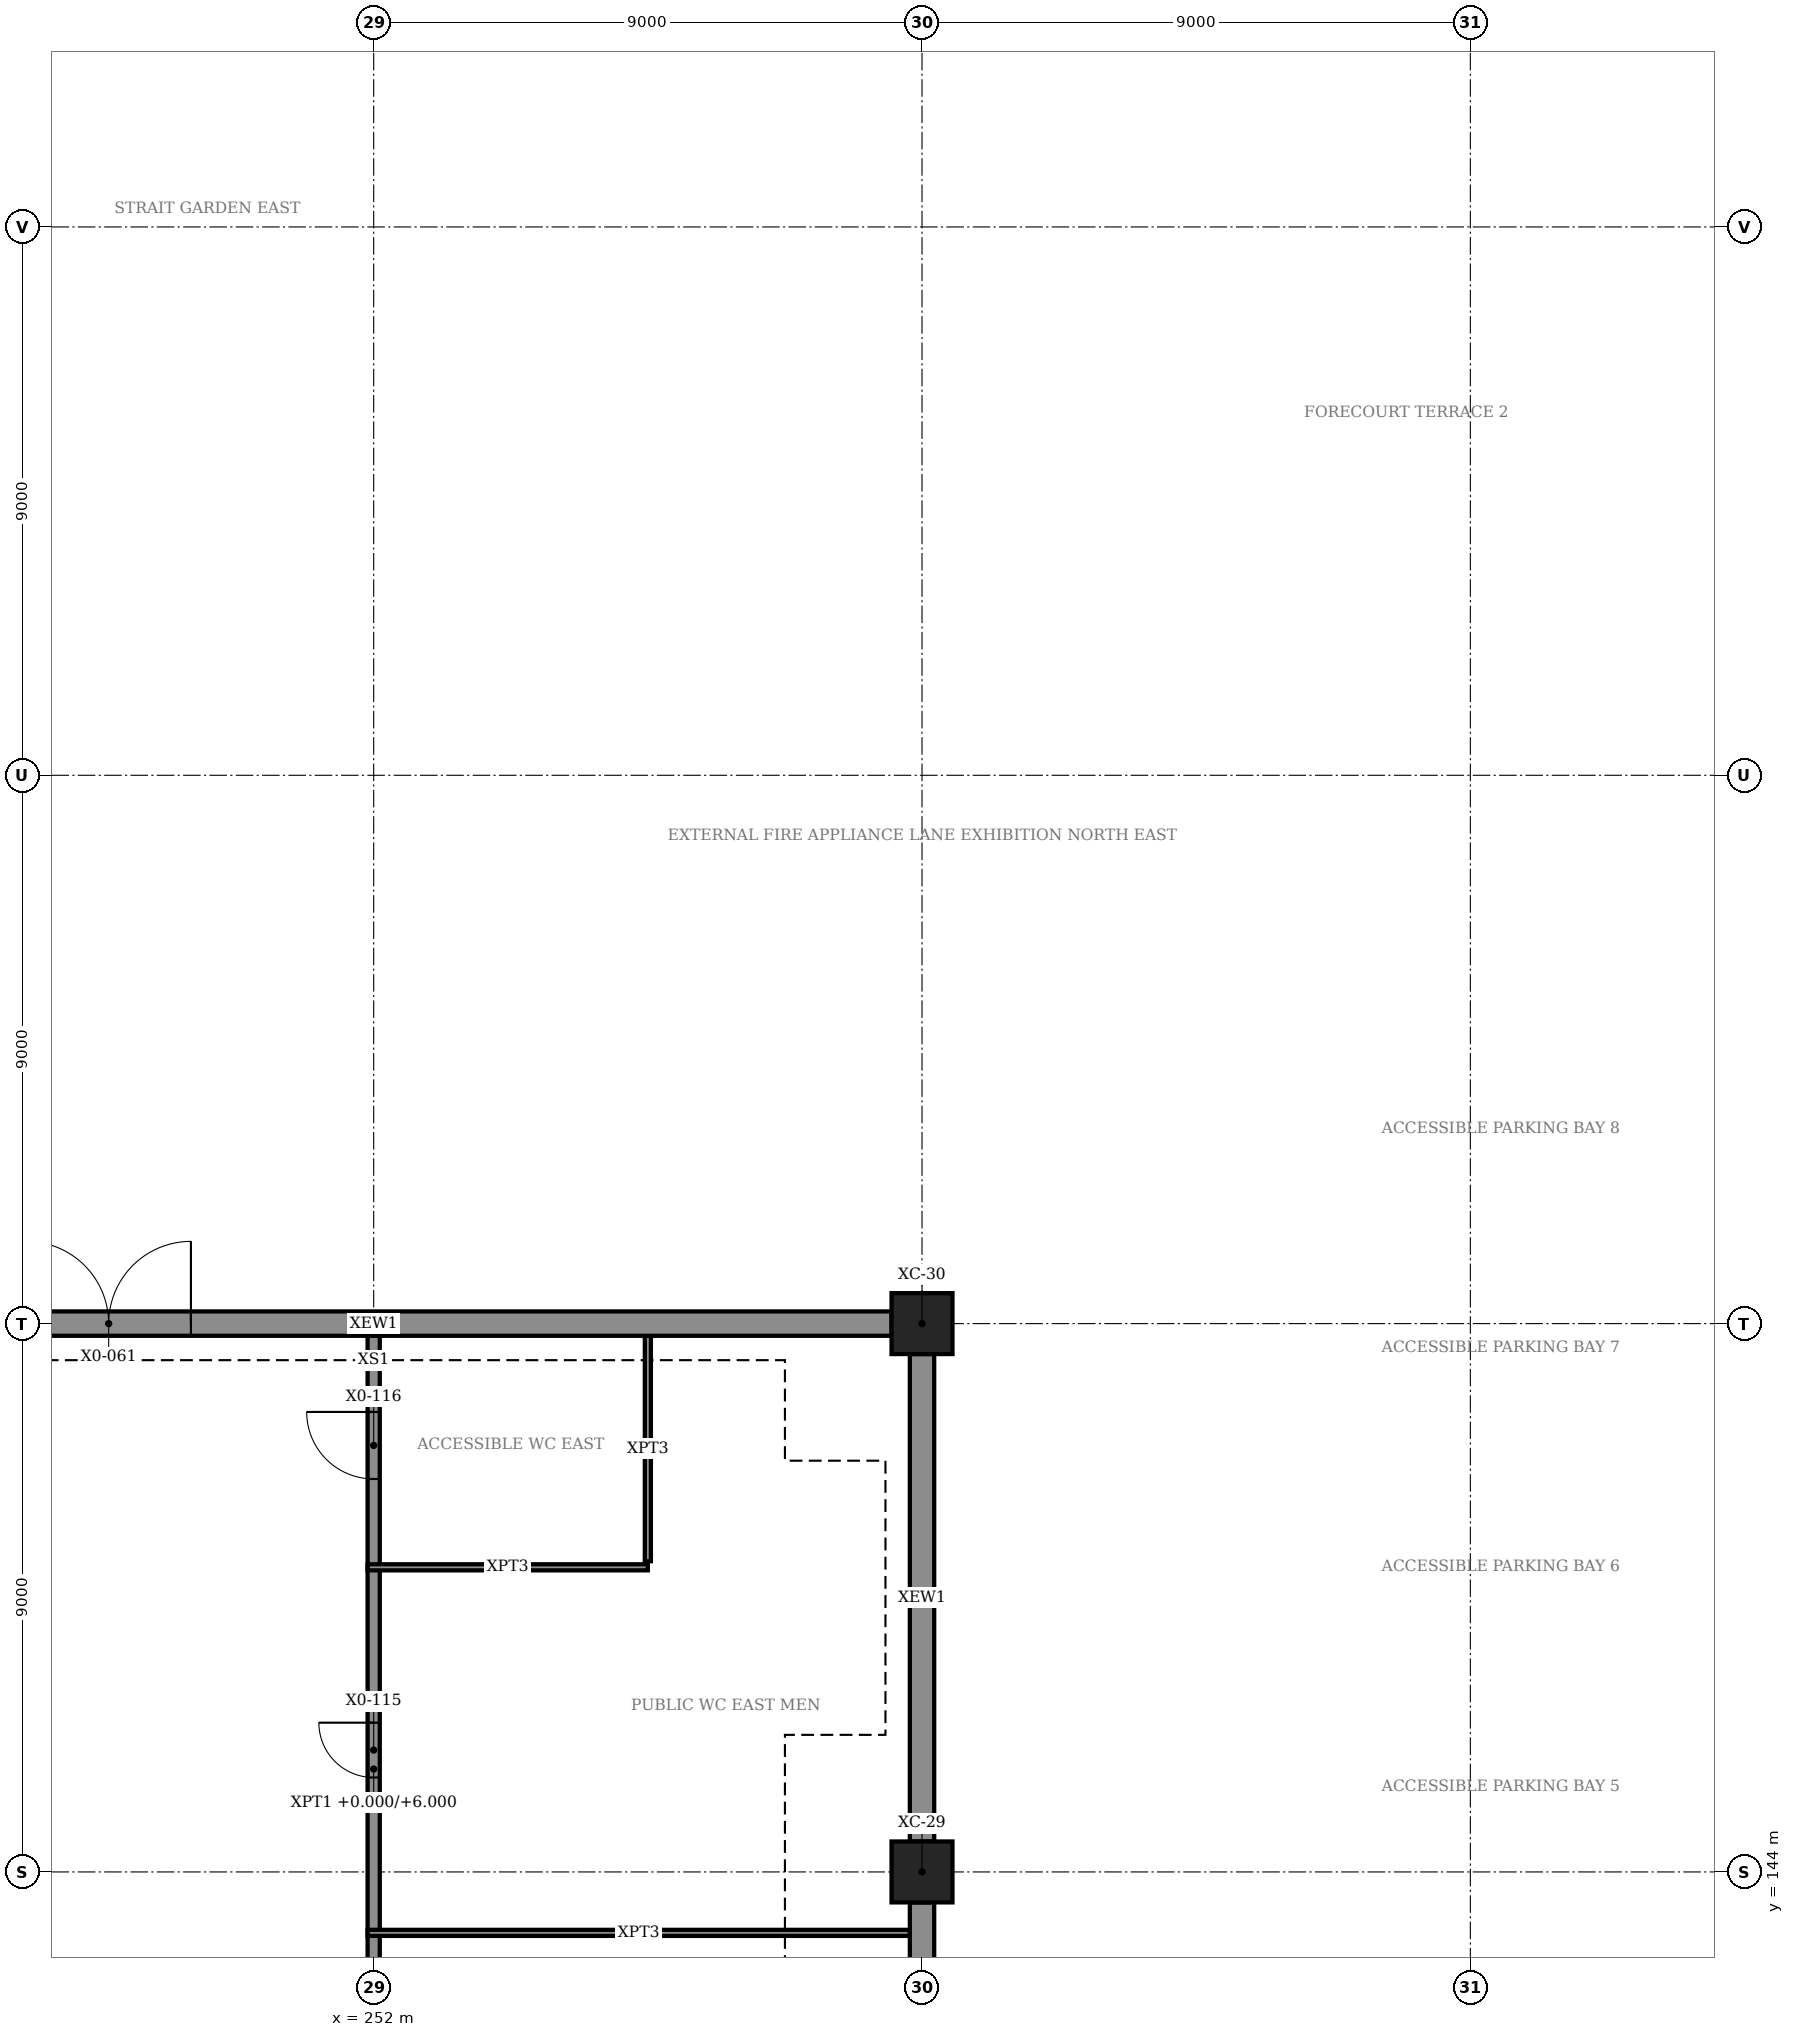
"""IFC4 building model, lengths in metres.
Left out: names, types, materials, properties, quantities, classifications, styles, units other than length and angle.
Written with IfcOpenShell. Run it as: python <this file> out.ifc"""

import sys

from ifc_helpers import new_model, si_unit, direction, frame, frame_2d, origin, origin_2d, place, context, subcontext, project, spatial, rectangle, hollow_rectangle, extrude, element, fill, save


model = new_model("IFC4")
c1 = context("Model", 3, precision=1e-05, world=origin(), true_north=direction((0.0, 1.0)))
c2 = subcontext(c1, "Body", "Model", "MODEL_VIEW")
j1 = project(units=[si_unit("LENGTHUNIT", "METRE"), si_unit("PLANEANGLEUNIT", "RADIAN")], contexts=[c1])
p1 = place(None, origin())
s1 = spatial("IfcSite", under=j1, at=p1, CompositionType="ELEMENT")
p2 = place(p1, origin())
s2 = spatial("IfcBuilding", under=s1, at=p2, CompositionType="ELEMENT")
p3 = place(p2, origin())
s3 = spatial("IfcBuildingStorey", under=s2, at=p3, CompositionType="ELEMENT", Elevation=0.0)
for number, where, z_axis, x_axis in (
    (1, (261.0, 144.0, 0.0), (0.0, 0.0, 1.0), (1.0, 0.0, 0.0)),
    (2, (261.0, 153.0, 0.0), (0.0, 0.0, 1.0), (1.0, 0.0, 0.0)),
):
    element("IfcColumn", number, at=place(p3, frame(where, z_axis=z_axis, x_axis=x_axis)), inside=s3, PredefinedType="COLUMN", context=c2, shape_type="SweptSolid", body=[
        extrude(hollow_rectangle(XDim=1.0, YDim=1.0, WallThickness=0.032, at=origin_2d()), origin(), (0.0, 0.0, 1.0), 6.0),
    ])
p4 = place(p3, frame((243.5, 153.0, 0.0), z_axis=(0.0, 0.0, 1.0), x_axis=(1.0, 0.0, 0.0)))
e3 = element("IfcWall", 3, at=p4, inside=s3, PredefinedType="SOLIDWALL", context=c2, shape_type="SweptSolid", body=[
    extrude(rectangle(XDim=17.0, YDim=0.4, at=frame_2d((8.5, 0.0))), origin(), (0.0, 0.0, 1.0), 6.0),
])
p5 = place(p4, frame((2.8, 0.0, 0.0)))
e4 = element("IfcOpeningElement", 4, at=p5, cuts=e3, PredefinedType="OPENING", context=c2, shape_type="SweptSolid", body=[
    extrude(rectangle(XDim=2.7, YDim=2.4, at=frame_2d((1.35, 1.2))), frame((0.0, 0.21, 0.0), z_axis=(0.0, -1.0, 0.0), x_axis=(1.0, 0.0, 0.0)), (0.0, 0.0, 1.0), 0.42),
])
p6 = place(p3, frame((261.0, 126.5, 0.0), z_axis=(0.0, 0.0, 1.0), x_axis=(0.0, 1.0, 0.0)))
e5 = element("IfcWall", 5, at=p6, inside=s3, PredefinedType="SOLIDWALL", context=c2, shape_type="SweptSolid", body=[
    extrude(rectangle(XDim=17.0, YDim=0.4, at=frame_2d((8.5, 0.0))), origin(), (0.0, 0.0, 1.0), 6.0),
])
p7 = place(p6, frame((1.15, 0.0, 0.0)))
e6 = element("IfcOpeningElement", 6, at=p7, cuts=e5, PredefinedType="OPENING", context=c2, shape_type="SweptSolid", body=[
    extrude(rectangle(XDim=2.7, YDim=2.4, at=frame_2d((1.35, 1.2))), frame((0.0, 0.21, 0.0), z_axis=(0.0, -1.0, 0.0), x_axis=(1.0, 0.0, 0.0)), (0.0, 0.0, 1.0), 0.42),
])
p8 = place(p6, frame((5.15, 0.0, 0.0)))
e7 = element("IfcOpeningElement", 7, at=p8, cuts=e5, PredefinedType="OPENING", context=c2, shape_type="SweptSolid", body=[
    extrude(rectangle(XDim=2.7, YDim=2.4, at=frame_2d((1.35, 1.2))), frame((0.0, 0.21, 0.0), z_axis=(0.0, -1.0, 0.0), x_axis=(1.0, 0.0, 0.0)), (0.0, 0.0, 1.0), 0.42),
])
p9 = place(p3, frame((261.0, 144.5, 0.0), z_axis=(0.0, 0.0, 1.0), x_axis=(0.0, 1.0, 0.0)))
e8 = element("IfcWall", 8, at=p9, inside=s3, PredefinedType="SOLIDWALL", context=c2, shape_type="SweptSolid", body=[
    extrude(rectangle(XDim=8.0, YDim=0.4, at=frame_2d((4.0, 0.0))), origin(), (0.0, 0.0, 1.0), 6.0),
])
p10 = place(p3, frame((252.0, 135.2, 0.0), z_axis=(0.0, 0.0, 1.0), x_axis=(0.0, 1.0, 0.0)))
e9 = element("IfcWall", 9, at=p10, inside=s3, PredefinedType="PARTITIONING", context=c2, shape_type="SweptSolid", body=[
    extrude(rectangle(XDim=17.6, YDim=0.2, at=frame_2d((8.8, 0.0))), origin(), (0.0, 0.0, 1.0), 6.0),
])
p11 = place(p10, frame((3.35, 0.0, 0.015)))
e10 = element("IfcOpeningElement", 10, at=p11, cuts=e9, PredefinedType="OPENING", context=c2, shape_type="SweptSolid", body=[
    extrude(rectangle(XDim=0.9, YDim=2.1, at=frame_2d((0.45, 1.05))), frame((0.0, 0.11, 0.0), z_axis=(0.0, -1.0, 0.0), x_axis=(1.0, 0.0, 0.0)), (0.0, 0.0, 1.0), 0.22),
])
p12 = place(p10, frame((10.35, 0.0, 0.015)))
e11 = element("IfcOpeningElement", 11, at=p12, cuts=e9, PredefinedType="OPENING", context=c2, shape_type="SweptSolid", body=[
    extrude(rectangle(XDim=0.9, YDim=2.1, at=frame_2d((0.45, 1.05))), frame((0.0, 0.11, 0.0), z_axis=(0.0, -1.0, 0.0), x_axis=(1.0, 0.0, 0.0)), (0.0, 0.0, 1.0), 0.22),
])
p13 = place(p10, frame((15.25, 0.0, 0.015)))
e12 = element("IfcOpeningElement", 12, at=p13, cuts=e9, PredefinedType="OPENING", context=c2, shape_type="SweptSolid", body=[
    extrude(rectangle(XDim=1.1, YDim=2.4, at=frame_2d((0.55, 1.2))), frame((0.0, 0.11, 0.0), z_axis=(0.0, -1.0, 0.0), x_axis=(1.0, 0.0, 0.0)), (0.0, 0.0, 1.0), 0.22),
])
p14 = place(p3, frame((260.8, 143.0, 0.0), z_axis=(0.0, 0.0, 1.0), x_axis=(-1.0, 0.0, 0.0)))
e13 = element("IfcWall", 13, at=p14, inside=s3, PredefinedType="PARTITIONING", context=c2, shape_type="SweptSolid", body=[
    extrude(rectangle(XDim=8.9, YDim=0.1, at=frame_2d((4.45, 0.0))), origin(), (0.0, 0.0, 1.0), 6.0),
])
p15 = place(p3, frame((256.5, 149.0, 0.0), z_axis=(0.0, 0.0, 1.0), x_axis=(-1.0, 0.0, 0.0)))
e14 = element("IfcWall", 14, at=p15, inside=s3, PredefinedType="PARTITIONING", context=c2, shape_type="SweptSolid", body=[
    extrude(rectangle(XDim=4.6, YDim=0.1, at=frame_2d((2.3, 0.0))), origin(), (0.0, 0.0, 1.0), 6.0),
])
p16 = place(p3, frame((256.5, 149.1, 0.0), z_axis=(0.0, 0.0, 1.0), x_axis=(0.0, 1.0, 0.0)))
e15 = element("IfcWall", 15, at=p16, inside=s3, PredefinedType="PARTITIONING", context=c2, shape_type="SweptSolid", body=[
    extrude(rectangle(XDim=3.7, YDim=0.1, at=frame_2d((1.85, 0.0))), origin(), (0.0, 0.0, 1.0), 6.0),
])
p17 = place(p5, origin())
e16 = element("IfcDoor", 16, at=p17, inside=s3, OperationType="DOUBLE_DOOR_SINGLE_SWING", PredefinedType="DOOR", context=c2, shape_type="SweptSolid", body=[
    extrude(rectangle(XDim=2.7, YDim=2.4, at=frame_2d((1.35, 1.2))), frame((0.0, 0.025, 0.0), z_axis=(0.0, -1.0, 0.0), x_axis=(1.0, 0.0, 0.0)), (0.0, 0.0, 1.0), 0.05),
])
fill(e4, e16)
p18 = place(p12, origin())
e17 = element("IfcDoor", 17, at=p18, inside=s3, OperationType="SINGLE_SWING_RIGHT", PredefinedType="DOOR", context=c2, shape_type="SweptSolid", body=[
    extrude(rectangle(XDim=0.9, YDim=2.1, at=frame_2d((0.45, 1.05))), frame((0.0, 0.025, 0.0), z_axis=(0.0, -1.0, 0.0), x_axis=(1.0, 0.0, 0.0)), (0.0, 0.0, 1.0), 0.05),
])
fill(e11, e17)
p19 = place(p13, origin())
e18 = element("IfcDoor", 18, at=p19, inside=s3, OperationType="SINGLE_SWING_RIGHT", PredefinedType="DOOR", context=c2, shape_type="SweptSolid", body=[
    extrude(rectangle(XDim=1.1, YDim=2.4, at=frame_2d((0.55, 1.2))), frame((0.0, 0.025, 0.0), z_axis=(0.0, -1.0, 0.0), x_axis=(1.0, 0.0, 0.0)), (0.0, 0.0, 1.0), 0.05),
])
fill(e12, e18)
save(model, sys.argv[1])
